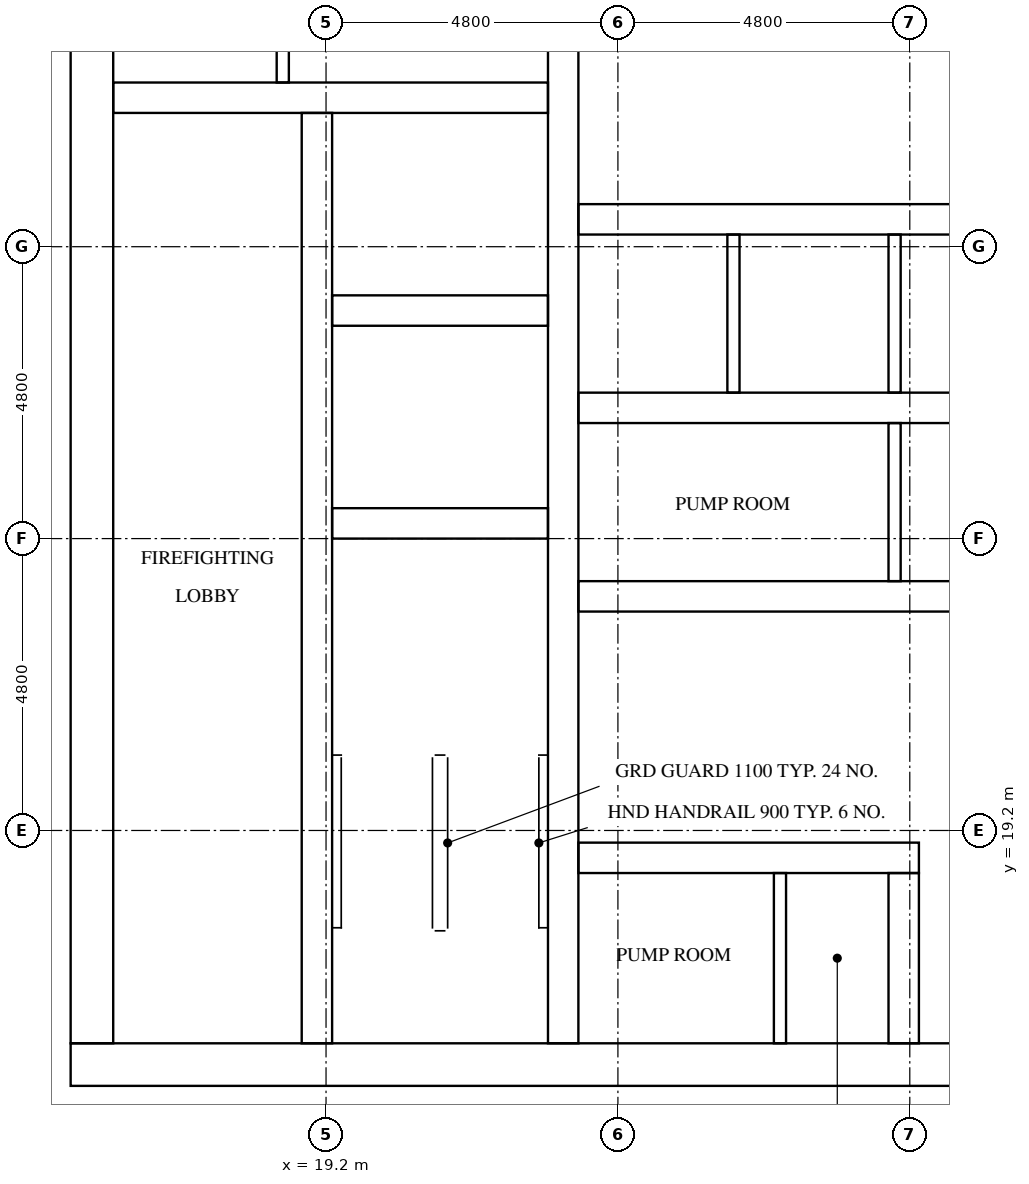
"""IFC4 building model, lengths in metres.
Left out: names, types, materials, properties, quantities, classifications, styles, units other than length and angle.
Written with IfcOpenShell. Run it as: python <this file> out.ifc"""

import sys

from ifc_helpers import new_model, si_unit, direction, frame, frame_2d, origin, place, context, subcontext, project, spatial, rectangle, extrude, element, fill, save


model = new_model("IFC4")
c1 = context("Model", 3, precision=1e-05, world=origin(), true_north=direction((0.0, 1.0)))
c2 = subcontext(c1, "Body", "Model", "MODEL_VIEW")
j1 = project(units=[si_unit("LENGTHUNIT", "METRE"), si_unit("PLANEANGLEUNIT", "RADIAN")], contexts=[c1])
p1 = place(None, origin())
s1 = spatial("IfcSite", under=j1, at=p1, CompositionType="ELEMENT")
p2 = place(p1, origin())
s2 = spatial("IfcBuilding", under=s1, at=p2, CompositionType="ELEMENT")
p3 = place(p2, frame((0.0, 0.0, 192.9)))
s3 = spatial("IfcBuildingStorey", under=s2, at=p3, CompositionType="ELEMENT", Elevation=192.9)
p4 = place(p3, frame((15.0, 15.35, 0.0), z_axis=(0.0, 0.0, 1.0), x_axis=(1.0, 0.0, 0.0)))
e1 = element("IfcWall", 1, at=p4, inside=s3, PredefinedType="SHEAR", context=c2, shape_type="SweptSolid", body=[
    extrude(rectangle(XDim=32.4, YDim=0.7, at=frame_2d((16.2, 0.0))), origin(), (0.0, 0.0, 1.0), 3.2),
])
p5 = place(p4, frame((15.3, 0.0, 0.0)))
e2 = element("IfcOpeningElement", 2, at=p5, cuts=e1, PredefinedType="OPENING", context=c2, shape_type="SweptSolid", body=[
    extrude(rectangle(XDim=1.8, YDim=2.1, at=frame_2d((0.9, 1.05))), frame((0.0, 0.36, 0.0), z_axis=(0.0, -1.0, 0.0), x_axis=(1.0, 0.0, 0.0)), (0.0, 0.0, 1.0), 0.72),
])
p6 = place(p3, frame((15.35, 15.7, 0.0), z_axis=(0.0, 0.0, 1.0), x_axis=(0.0, 1.0, 0.0)))
e3 = element("IfcWall", 3, at=p6, inside=s3, PredefinedType="SHEAR", context=c2, shape_type="SweptSolid", body=[
    extrude(rectangle(XDim=21.4, YDim=0.7, at=frame_2d((10.7, 0.0))), origin(), (0.0, 0.0, 1.0), 3.2),
])
p7 = place(p6, frame((5.06, 0.0, 0.0)))
e4 = element("IfcOpeningElement", 4, at=p7, cuts=e3, PredefinedType="OPENING", context=c2, shape_type="SweptSolid", body=[
    extrude(rectangle(XDim=1.2, YDim=2.1, at=frame_2d((0.6, 1.05))), frame((0.0, 0.36, 0.0), z_axis=(0.0, -1.0, 0.0), x_axis=(1.0, 0.0, 0.0)), (0.0, 0.0, 1.0), 0.72),
])
p8 = place(p3, frame((19.05, 15.7, 0.0), z_axis=(0.0, 0.0, 1.0), x_axis=(0.0, 1.0, 0.0)))
e5 = element("IfcWall", 5, at=p8, inside=s3, PredefinedType="SHEAR", context=c2, shape_type="SweptSolid", body=[
    extrude(rectangle(XDim=15.3, YDim=0.5, at=frame_2d((7.65, 0.0))), origin(), (0.0, 0.0, 1.0), 3.2),
])
p9 = place(p8, frame((9.75, 0.0, 0.0)))
e6 = element("IfcOpeningElement", 6, at=p9, cuts=e5, PredefinedType="OPENING", context=c2, shape_type="SweptSolid", body=[
    extrude(rectangle(XDim=1.1, YDim=2.1, at=frame_2d((0.55, 1.05))), frame((0.0, 0.26, 0.0), z_axis=(0.0, -1.0, 0.0), x_axis=(1.0, 0.0, 0.0)), (0.0, 0.0, 1.0), 0.52),
])
p10 = place(p8, frame((13.25, 0.0, 0.0)))
e7 = element("IfcOpeningElement", 7, at=p10, cuts=e5, PredefinedType="OPENING", context=c2, shape_type="SweptSolid", body=[
    extrude(rectangle(XDim=1.1, YDim=2.1, at=frame_2d((0.55, 1.05))), frame((0.0, 0.26, 0.0), z_axis=(0.0, -1.0, 0.0), x_axis=(1.0, 0.0, 0.0)), (0.0, 0.0, 1.0), 0.52),
])
p11 = place(p8, frame((0.5, 0.0, 0.0)))
e8 = element("IfcOpeningElement", 8, at=p11, cuts=e5, PredefinedType="OPENING", context=c2, shape_type="SweptSolid", body=[
    extrude(rectangle(XDim=1.2, YDim=2.1, at=frame_2d((0.6, 1.05))), frame((0.0, 0.26, 0.0), z_axis=(0.0, -1.0, 0.0), x_axis=(1.0, 0.0, 0.0)), (0.0, 0.0, 1.0), 0.52),
])
p12 = place(p3, frame((23.1, 15.7, 0.0), z_axis=(0.0, 0.0, 1.0), x_axis=(0.0, 1.0, 0.0)))
e9 = element("IfcWall", 9, at=p12, inside=s3, PredefinedType="SHEAR", context=c2, shape_type="SweptSolid", body=[
    extrude(rectangle(XDim=21.4, YDim=0.5, at=frame_2d((10.7, 0.0))), origin(), (0.0, 0.0, 1.0), 3.2),
])
for number, where, z_axis, x_axis in (
    (10, (19.3, 24.25, 0.0), (0.0, 0.0, 1.0), (1.0, 0.0, 0.0)),
    (11, (19.3, 27.75, 0.0), (0.0, 0.0, 1.0), (1.0, 0.0, 0.0)),
):
    element("IfcWall", number, at=place(p3, frame(where, z_axis=z_axis, x_axis=x_axis)), inside=s3, PredefinedType="SHEAR", context=c2, shape_type="SweptSolid", body=[
        extrude(rectangle(XDim=3.55, YDim=0.5, at=frame_2d((1.775, 0.0))), origin(), (0.0, 0.0, 1.0), 3.2),
    ])
p13 = place(p3, frame((15.7, 31.25, 0.0), z_axis=(0.0, 0.0, 1.0), x_axis=(1.0, 0.0, 0.0)))
e12 = element("IfcWall", 12, at=p13, inside=s3, PredefinedType="SHEAR", context=c2, shape_type="SweptSolid", body=[
    extrude(rectangle(XDim=7.15, YDim=0.5, at=frame_2d((3.575, 0.0))), origin(), (0.0, 0.0, 1.0), 3.2),
])
p14 = place(p3, frame((23.35, 18.75, 0.0), z_axis=(0.0, 0.0, 1.0), x_axis=(1.0, 0.0, 0.0)))
e13 = element("IfcWall", 13, at=p14, inside=s3, PredefinedType="SHEAR", context=c2, shape_type="SweptSolid", body=[
    extrude(rectangle(XDim=5.6, YDim=0.5, at=frame_2d((2.8, 0.0))), origin(), (0.0, 0.0, 1.0), 3.2),
])
p15 = place(p14, frame((1.107, 0.0, 0.0)))
e14 = element("IfcOpeningElement", 14, at=p15, cuts=e13, PredefinedType="OPENING", context=c2, shape_type="SweptSolid", body=[
    extrude(rectangle(XDim=1.0, YDim=2.1, at=frame_2d((0.5, 1.05))), frame((0.0, 0.26, 0.0), z_axis=(0.0, -1.0, 0.0), x_axis=(1.0, 0.0, 0.0)), (0.0, 0.0, 1.0), 0.52),
])
p16 = place(p14, frame((3.758, 0.0, 0.0)))
e15 = element("IfcOpeningElement", 15, at=p16, cuts=e13, PredefinedType="OPENING", context=c2, shape_type="SweptSolid", body=[
    extrude(rectangle(XDim=1.0, YDim=2.1, at=frame_2d((0.5, 1.05))), frame((0.0, 0.26, 0.0), z_axis=(0.0, -1.0, 0.0), x_axis=(1.0, 0.0, 0.0)), (0.0, 0.0, 1.0), 0.52),
])
p17 = place(p3, frame((23.35, 23.05, 0.0), z_axis=(0.0, 0.0, 1.0), x_axis=(1.0, 0.0, 0.0)))
e16 = element("IfcWall", 16, at=p17, inside=s3, PredefinedType="SHEAR", context=c2, shape_type="SweptSolid", body=[
    extrude(rectangle(XDim=15.7, YDim=0.5, at=frame_2d((7.85, 0.0))), origin(), (0.0, 0.0, 1.0), 3.2),
])
p18 = place(p17, frame((2.05, 0.0, 0.0)))
e17 = element("IfcOpeningElement", 17, at=p18, cuts=e16, PredefinedType="OPENING", context=c2, shape_type="SweptSolid", body=[
    extrude(rectangle(XDim=1.0, YDim=2.1, at=frame_2d((0.5, 1.05))), frame((0.0, 0.26, 0.0), z_axis=(0.0, -1.0, 0.0), x_axis=(1.0, 0.0, 0.0)), (0.0, 0.0, 1.0), 0.52),
])
p19 = place(p17, frame((11.784, 0.0, 0.0)))
e18 = element("IfcOpeningElement", 18, at=p19, cuts=e16, PredefinedType="OPENING", context=c2, shape_type="SweptSolid", body=[
    extrude(rectangle(XDim=1.0, YDim=2.1, at=frame_2d((0.5, 1.05))), frame((0.0, 0.26, 0.0), z_axis=(0.0, -1.0, 0.0), x_axis=(1.0, 0.0, 0.0)), (0.0, 0.0, 1.0), 0.52),
])
p20 = place(p17, frame((14.434, 0.0, 0.0)))
e19 = element("IfcOpeningElement", 19, at=p20, cuts=e16, PredefinedType="OPENING", context=c2, shape_type="SweptSolid", body=[
    extrude(rectangle(XDim=1.0, YDim=2.1, at=frame_2d((0.5, 1.05))), frame((0.0, 0.26, 0.0), z_axis=(0.0, -1.0, 0.0), x_axis=(1.0, 0.0, 0.0)), (0.0, 0.0, 1.0), 0.52),
])
p21 = place(p3, frame((23.35, 26.15, 0.0), z_axis=(0.0, 0.0, 1.0), x_axis=(1.0, 0.0, 0.0)))
e20 = element("IfcWall", 20, at=p21, inside=s3, PredefinedType="SHEAR", context=c2, shape_type="SweptSolid", body=[
    extrude(rectangle(XDim=15.7, YDim=0.5, at=frame_2d((7.85, 0.0))), origin(), (0.0, 0.0, 1.0), 3.2),
])
p22 = place(p3, frame((23.35, 29.25, 0.0), z_axis=(0.0, 0.0, 1.0), x_axis=(1.0, 0.0, 0.0)))
e21 = element("IfcWall", 21, at=p22, inside=s3, PredefinedType="SHEAR", context=c2, shape_type="SweptSolid", body=[
    extrude(rectangle(XDim=15.7, YDim=0.5, at=frame_2d((7.85, 0.0))), origin(), (0.0, 0.0, 1.0), 3.2),
])
p23 = place(p22, frame((0.675, 0.0, 0.0)))
e22 = element("IfcOpeningElement", 22, at=p23, cuts=e21, PredefinedType="OPENING", context=c2, shape_type="SweptSolid", body=[
    extrude(rectangle(XDim=1.1, YDim=2.1, at=frame_2d((0.55, 1.05))), frame((0.0, 0.26, 0.0), z_axis=(0.0, -1.0, 0.0), x_axis=(1.0, 0.0, 0.0)), (0.0, 0.0, 1.0), 0.52),
])
p24 = place(p22, frame((3.325, 0.0, 0.0)))
e23 = element("IfcOpeningElement", 23, at=p24, cuts=e21, PredefinedType="OPENING", context=c2, shape_type="SweptSolid", body=[
    extrude(rectangle(XDim=1.1, YDim=2.1, at=frame_2d((0.55, 1.05))), frame((0.0, 0.26, 0.0), z_axis=(0.0, -1.0, 0.0), x_axis=(1.0, 0.0, 0.0)), (0.0, 0.0, 1.0), 0.52),
])
p25 = place(p22, frame((5.975, 0.0, 0.0)))
e24 = element("IfcOpeningElement", 24, at=p25, cuts=e21, PredefinedType="OPENING", context=c2, shape_type="SweptSolid", body=[
    extrude(rectangle(XDim=1.1, YDim=2.1, at=frame_2d((0.55, 1.05))), frame((0.0, 0.26, 0.0), z_axis=(0.0, -1.0, 0.0), x_axis=(1.0, 0.0, 0.0)), (0.0, 0.0, 1.0), 0.52),
])
p26 = place(p22, frame((8.625, 0.0, 0.0)))
e25 = element("IfcOpeningElement", 25, at=p26, cuts=e21, PredefinedType="OPENING", context=c2, shape_type="SweptSolid", body=[
    extrude(rectangle(XDim=1.1, YDim=2.1, at=frame_2d((0.55, 1.05))), frame((0.0, 0.26, 0.0), z_axis=(0.0, -1.0, 0.0), x_axis=(1.0, 0.0, 0.0)), (0.0, 0.0, 1.0), 0.52),
])
p27 = place(p22, frame((11.275, 0.0, 0.0)))
e26 = element("IfcOpeningElement", 26, at=p27, cuts=e21, PredefinedType="OPENING", context=c2, shape_type="SweptSolid", body=[
    extrude(rectangle(XDim=1.1, YDim=2.1, at=frame_2d((0.55, 1.05))), frame((0.0, 0.26, 0.0), z_axis=(0.0, -1.0, 0.0), x_axis=(1.0, 0.0, 0.0)), (0.0, 0.0, 1.0), 0.52),
])
p28 = place(p22, frame((13.925, 0.0, 0.0)))
e27 = element("IfcOpeningElement", 27, at=p28, cuts=e21, PredefinedType="OPENING", context=c2, shape_type="SweptSolid", body=[
    extrude(rectangle(XDim=1.1, YDim=2.1, at=frame_2d((0.55, 1.05))), frame((0.0, 0.26, 0.0), z_axis=(0.0, -1.0, 0.0), x_axis=(1.0, 0.0, 0.0)), (0.0, 0.0, 1.0), 0.52),
])
p29 = place(p3, frame((28.7, 15.7, 0.0), z_axis=(0.0, 0.0, 1.0), x_axis=(0.0, 1.0, 0.0)))
e28 = element("IfcWall", 28, at=p29, inside=s3, PredefinedType="SHEAR", context=c2, shape_type="SweptSolid", body=[
    extrude(rectangle(XDim=2.8, YDim=0.5, at=frame_2d((1.4, 0.0))), origin(), (0.0, 0.0, 1.0), 3.2),
])
p30 = place(p3, frame((25.9, 26.4, 0.0), z_axis=(0.0, 0.0, 1.0), x_axis=(0.0, 1.0, 0.0)))
e29 = element("IfcWall", 29, at=p30, inside=s3, PredefinedType="SOLIDWALL", context=c2, shape_type="SweptSolid", body=[
    extrude(rectangle(XDim=2.6, YDim=0.2, at=frame_2d((1.3, 0.0))), origin(), (0.0, 0.0, 1.0), 3.2),
])
p31 = place(p3, frame((28.55, 23.3, 0.0), z_axis=(0.0, 0.0, 1.0), x_axis=(0.0, 1.0, 0.0)))
e30 = element("IfcWall", 30, at=p31, inside=s3, PredefinedType="SOLIDWALL", context=c2, shape_type="SweptSolid", body=[
    extrude(rectangle(XDim=2.6, YDim=0.2, at=frame_2d((1.3, 0.0))), origin(), (0.0, 0.0, 1.0), 3.2),
])
p32 = place(p3, frame((28.55, 26.4, 0.0), z_axis=(0.0, 0.0, 1.0), x_axis=(0.0, 1.0, 0.0)))
e31 = element("IfcWall", 31, at=p32, inside=s3, PredefinedType="SOLIDWALL", context=c2, shape_type="SweptSolid", body=[
    extrude(rectangle(XDim=2.6, YDim=0.2, at=frame_2d((1.3, 0.0))), origin(), (0.0, 0.0, 1.0), 3.2),
])
p33 = place(p3, frame((18.489, 31.5, 0.0), z_axis=(0.0, 0.0, 1.0), x_axis=(0.0, 1.0, 0.0)))
e32 = element("IfcWall", 32, at=p33, inside=s3, PredefinedType="PARTITIONING", context=c2, shape_type="SweptSolid", body=[
    extrude(rectangle(XDim=5.6, YDim=0.2, at=frame_2d((2.8, 0.0))), origin(), (0.0, 0.0, 1.0), 3.2),
])
p34 = place(p3, frame((26.665, 15.7, 0.0), z_axis=(0.0, 0.0, 1.0), x_axis=(0.0, 1.0, 0.0)))
e33 = element("IfcWall", 33, at=p34, inside=s3, PredefinedType="PARTITIONING", context=c2, shape_type="SweptSolid", body=[
    extrude(rectangle(XDim=2.8, YDim=0.2, at=frame_2d((1.4, 0.0))), origin(), (0.0, 0.0, 1.0), 3.2),
])
p35 = place(p23, origin())
e34 = element("IfcDoor", 34, at=p35, inside=s3, OperationType="DOUBLE_DOOR_SLIDING", PredefinedType="DOOR", context=c2, shape_type="SweptSolid", body=[
    extrude(rectangle(XDim=1.1, YDim=2.1, at=frame_2d((0.55, 1.05))), frame((0.0, 0.025, 0.0), z_axis=(0.0, -1.0, 0.0), x_axis=(1.0, 0.0, 0.0)), (0.0, 0.0, 1.0), 0.05),
])
fill(e22, e34)
p36 = place(p24, origin())
e35 = element("IfcDoor", 35, at=p36, inside=s3, OperationType="DOUBLE_DOOR_SLIDING", PredefinedType="DOOR", context=c2, shape_type="SweptSolid", body=[
    extrude(rectangle(XDim=1.1, YDim=2.1, at=frame_2d((0.55, 1.05))), frame((0.0, 0.025, 0.0), z_axis=(0.0, -1.0, 0.0), x_axis=(1.0, 0.0, 0.0)), (0.0, 0.0, 1.0), 0.05),
])
fill(e23, e35)
p37 = place(p25, origin())
e36 = element("IfcDoor", 36, at=p37, inside=s3, OperationType="DOUBLE_DOOR_SLIDING", PredefinedType="DOOR", context=c2, shape_type="SweptSolid", body=[
    extrude(rectangle(XDim=1.1, YDim=2.1, at=frame_2d((0.55, 1.05))), frame((0.0, 0.025, 0.0), z_axis=(0.0, -1.0, 0.0), x_axis=(1.0, 0.0, 0.0)), (0.0, 0.0, 1.0), 0.05),
])
fill(e24, e36)
p38 = place(p9, origin())
e37 = element("IfcDoor", 37, at=p38, inside=s3, OperationType="DOUBLE_DOOR_SLIDING", PredefinedType="DOOR", context=c2, shape_type="SweptSolid", body=[
    extrude(rectangle(XDim=1.1, YDim=2.1, at=frame_2d((0.55, 1.05))), frame((0.0, 0.025, 0.0), z_axis=(0.0, -1.0, 0.0), x_axis=(1.0, 0.0, 0.0)), (0.0, 0.0, 1.0), 0.05),
])
fill(e6, e37)
p39 = place(p10, origin())
e38 = element("IfcDoor", 38, at=p39, inside=s3, OperationType="DOUBLE_DOOR_SLIDING", PredefinedType="DOOR", context=c2, shape_type="SweptSolid", body=[
    extrude(rectangle(XDim=1.1, YDim=2.1, at=frame_2d((0.55, 1.05))), frame((0.0, 0.025, 0.0), z_axis=(0.0, -1.0, 0.0), x_axis=(1.0, 0.0, 0.0)), (0.0, 0.0, 1.0), 0.05),
])
fill(e7, e38)
p40 = place(p11, frame((1.2, 0.0, 0.0), z_axis=(0.0, 0.0, 1.0), x_axis=(-1.0, 0.0, 0.0)))
e39 = element("IfcDoor", 39, at=p40, inside=s3, OperationType="SINGLE_SWING_RIGHT", PredefinedType="DOOR", context=c2, shape_type="SweptSolid", body=[
    extrude(rectangle(XDim=1.2, YDim=2.1, at=frame_2d((0.6, 1.05))), frame((0.0, 0.025, 0.0), z_axis=(0.0, -1.0, 0.0), x_axis=(1.0, 0.0, 0.0)), (0.0, 0.0, 1.0), 0.05),
])
fill(e8, e39)
p41 = place(p7, frame((1.2, 0.0, 0.0), z_axis=(0.0, 0.0, 1.0), x_axis=(-1.0, 0.0, 0.0)))
e40 = element("IfcDoor", 40, at=p41, inside=s3, OperationType="SINGLE_SWING_LEFT", PredefinedType="DOOR", context=c2, shape_type="SweptSolid", body=[
    extrude(rectangle(XDim=1.2, YDim=2.1, at=frame_2d((0.6, 1.05))), frame((0.0, 0.025, 0.0), z_axis=(0.0, -1.0, 0.0), x_axis=(1.0, 0.0, 0.0)), (0.0, 0.0, 1.0), 0.05),
])
fill(e4, e40)
p42 = place(p18, frame((1.0, 0.0, 0.0), z_axis=(0.0, 0.0, 1.0), x_axis=(-1.0, 0.0, 0.0)))
e41 = element("IfcDoor", 41, at=p42, inside=s3, OperationType="SINGLE_SWING_LEFT", PredefinedType="DOOR", context=c2, shape_type="SweptSolid", body=[
    extrude(rectangle(XDim=1.0, YDim=2.1, at=frame_2d((0.5, 1.05))), frame((0.0, 0.025, 0.0), z_axis=(0.0, -1.0, 0.0), x_axis=(1.0, 0.0, 0.0)), (0.0, 0.0, 1.0), 0.05),
])
fill(e17, e41)
p43 = place(p15, origin())
e42 = element("IfcDoor", 42, at=p43, inside=s3, OperationType="SINGLE_SWING_RIGHT", PredefinedType="DOOR", context=c2, shape_type="SweptSolid", body=[
    extrude(rectangle(XDim=1.0, YDim=2.1, at=frame_2d((0.5, 1.05))), frame((0.0, 0.025, 0.0), z_axis=(0.0, -1.0, 0.0), x_axis=(1.0, 0.0, 0.0)), (0.0, 0.0, 1.0), 0.05),
])
fill(e14, e42)
p44 = place(p16, origin())
e43 = element("IfcDoor", 43, at=p44, inside=s3, OperationType="SINGLE_SWING_LEFT", PredefinedType="DOOR", context=c2, shape_type="SweptSolid", body=[
    extrude(rectangle(XDim=1.0, YDim=2.1, at=frame_2d((0.5, 1.05))), frame((0.0, 0.025, 0.0), z_axis=(0.0, -1.0, 0.0), x_axis=(1.0, 0.0, 0.0)), (0.0, 0.0, 1.0), 0.05),
])
fill(e15, e43)
save(model, sys.argv[1])
